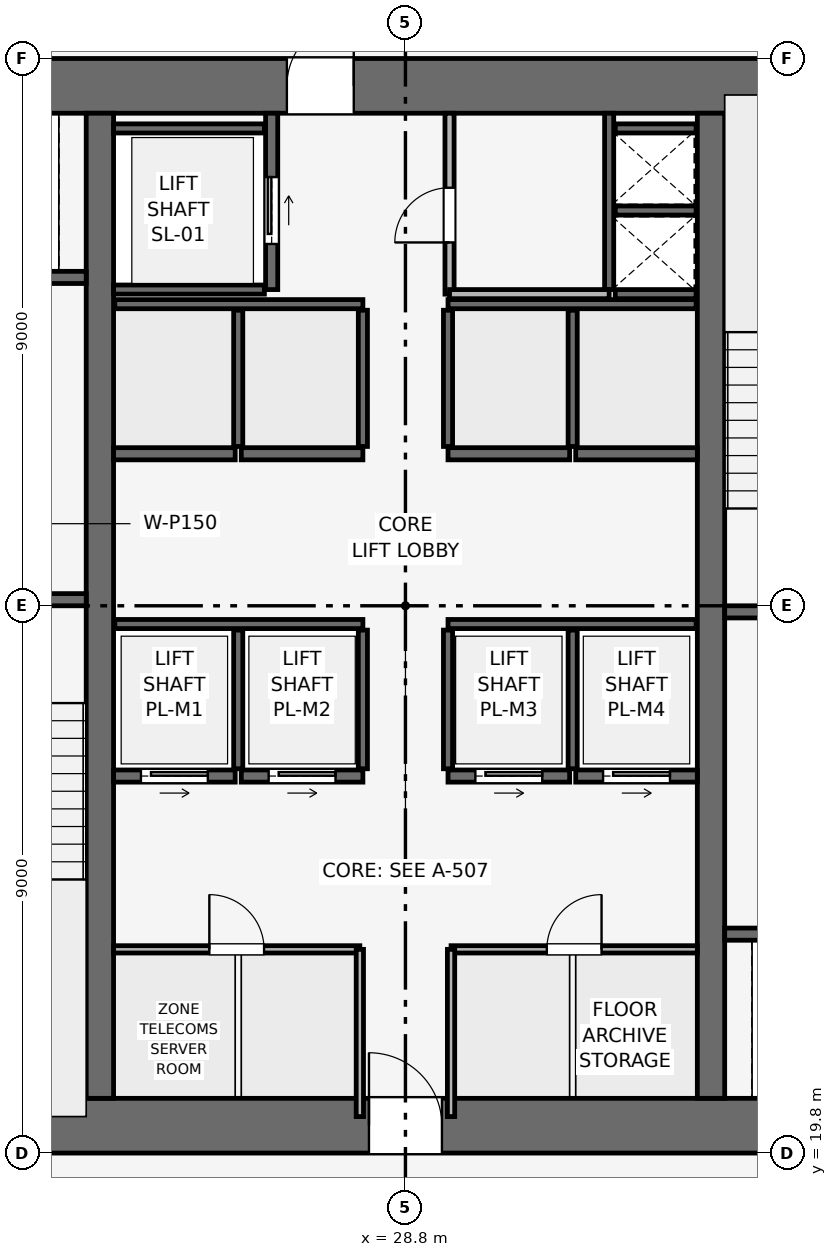
"""IFC4 building model, lengths in metres.
Left out: names, types, materials, properties, quantities, classifications, styles, units other than length and angle.
Written with IfcOpenShell. Run it as: python <this file> out.ifc"""

import sys

from ifc_helpers import new_model, si_unit, direction, frame, frame_2d, origin, place, context, subcontext, project, spatial, rectangle, extrude, element, fill, save


model = new_model("IFC4")
c1 = context("Model", 3, precision=1e-05, world=origin(), true_north=direction((0.0, 1.0)))
c2 = subcontext(c1, "Body", "Model", "MODEL_VIEW")
j1 = project(units=[si_unit("LENGTHUNIT", "METRE"), si_unit("PLANEANGLEUNIT", "RADIAN")], contexts=[c1])
p1 = place(None, origin())
s1 = spatial("IfcSite", under=j1, at=p1, CompositionType="ELEMENT")
p2 = place(p1, origin())
s2 = spatial("IfcBuilding", under=s1, at=p2, CompositionType="ELEMENT")
p3 = place(p2, frame((0.0, 0.0, 157.05)))
s3 = spatial("IfcBuildingStorey", under=s2, at=p3, CompositionType="ELEMENT", Elevation=157.05)
p4 = place(p3, frame((19.8, 20.25, 0.0), z_axis=(0.0, 0.0, 1.0), x_axis=(1.0, 0.0, 0.0)))
e1 = element("IfcWall", 1, at=p4, inside=s3, PredefinedType="SHEAR", context=c2, shape_type="SweptSolid", body=[
    extrude(rectangle(XDim=18.0, YDim=0.9, at=frame_2d((9.0, 0.0))), origin(), (0.0, 0.0, 1.0), 3.75),
])
p5 = place(p4, frame((8.4, 0.0, 0.0)))
e2 = element("IfcOpeningElement", 2, at=p5, cuts=e1, PredefinedType="OPENING", context=c2, shape_type="SweptSolid", body=[
    extrude(rectangle(XDim=1.2, YDim=2.2, at=frame_2d((0.6, 1.1))), frame((0.0, 0.46, 0.0), z_axis=(0.0, -1.0, 0.0), x_axis=(1.0, 0.0, 0.0)), (0.0, 0.0, 1.0), 0.92),
])
p6 = place(p3, frame((19.8, 37.35, 0.0), z_axis=(0.0, 0.0, 1.0), x_axis=(1.0, 0.0, 0.0)))
e3 = element("IfcWall", 3, at=p6, inside=s3, PredefinedType="SHEAR", context=c2, shape_type="SweptSolid", body=[
    extrude(rectangle(XDim=18.0, YDim=0.9, at=frame_2d((9.0, 0.0))), origin(), (0.0, 0.0, 1.0), 3.75),
])
p7 = place(p6, frame((7.05, 0.0, 0.0)))
e4 = element("IfcOpeningElement", 4, at=p7, cuts=e3, PredefinedType="OPENING", context=c2, shape_type="SweptSolid", body=[
    extrude(rectangle(XDim=1.1, YDim=2.15, at=frame_2d((0.55, 1.075))), frame((0.0, 0.46, 0.0), z_axis=(0.0, -1.0, 0.0), x_axis=(1.0, 0.0, 0.0)), (0.0, 0.0, 1.0), 0.92),
])
for number, where, z_axis, x_axis in (
    (5, (23.775, 20.7, 0.0), (0.0, 0.0, 1.0), (0.0, 1.0, 0.0)),
    (6, (33.825, 20.7, 0.0), (0.0, 0.0, 1.0), (0.0, 1.0, 0.0)),
):
    element("IfcWall", number, at=place(p3, frame(where, z_axis=z_axis, x_axis=x_axis)), inside=s3, PredefinedType="SHEAR", context=c2, shape_type="SweptSolid", body=[
        extrude(rectangle(XDim=16.2, YDim=0.45, at=frame_2d((8.1, 0.0))), origin(), (0.0, 0.0, 1.0), 3.75),
    ])
p8 = place(p3, frame((20.4, 28.9, 0.0), z_axis=(0.0, 0.0, 1.0), x_axis=(1.0, 0.0, 0.0)))
e7 = element("IfcWall", 7, at=p8, inside=s3, PredefinedType="SHEAR", context=c2, shape_type="SweptSolid", body=[
    extrude(rectangle(XDim=3.15, YDim=0.2, at=frame_2d((1.575, 0.0))), origin(), (0.0, 0.0, 1.0), 3.495),
])
p9 = place(p8, frame((0.8, 0.0, 0.0)))
e8 = element("IfcOpeningElement", 8, at=p9, cuts=e7, PredefinedType="OPENING", context=c2, shape_type="SweptSolid", body=[
    extrude(rectangle(XDim=1.0, YDim=2.1, at=frame_2d((0.5, 1.05))), frame((0.0, 0.11, 0.0), z_axis=(0.0, -1.0, 0.0), x_axis=(1.0, 0.0, 0.0)), (0.0, 0.0, 1.0), 0.22),
])
p10 = place(p3, frame((34.05, 28.7, 0.0), z_axis=(0.0, 0.0, 1.0), x_axis=(1.0, 0.0, 0.0)))
e9 = element("IfcWall", 9, at=p10, inside=s3, PredefinedType="SHEAR", context=c2, shape_type="SweptSolid", body=[
    extrude(rectangle(XDim=3.15, YDim=0.2, at=frame_2d((1.575, 0.0))), origin(), (0.0, 0.0, 1.0), 3.495),
])
p11 = place(p10, frame((0.8, 0.0, 0.0)))
e10 = element("IfcOpeningElement", 10, at=p11, cuts=e9, PredefinedType="OPENING", context=c2, shape_type="SweptSolid", body=[
    extrude(rectangle(XDim=1.0, YDim=2.1, at=frame_2d((0.5, 1.05))), frame((0.0, 0.11, 0.0), z_axis=(0.0, -1.0, 0.0), x_axis=(1.0, 0.0, 0.0)), (0.0, 0.0, 1.0), 0.22),
])
p12 = place(p3, frame((32.15, 34.0, 0.0), z_axis=(0.0, 0.0, 1.0), x_axis=(0.0, 1.0, 0.0)))
e11 = element("IfcWall", 11, at=p12, inside=s3, PredefinedType="SHEAR", context=c2, shape_type="SweptSolid", body=[
    extrude(rectangle(XDim=2.9, YDim=0.15, at=frame_2d((1.45, 0.0))), origin(), (0.0, 0.0, 1.0), 3.495),
])
for number, where, z_axis, x_axis in (
    (12, (32.25, 33.925, 0.0), (0.0, 0.0, 1.0), (1.0, 0.0, 0.0)),
    (13, (32.25, 35.3, 0.0), (0.0, 0.0, 1.0), (1.0, 0.0, 0.0)),
):
    element("IfcWall", number, at=place(p3, frame(where, z_axis=z_axis, x_axis=x_axis)), inside=s3, PredefinedType="SHEAR", context=c2, shape_type="SweptSolid", body=[
        extrude(rectangle(XDim=1.33, YDim=0.15, at=frame_2d((0.665, 0.0))), origin(), (0.0, 0.0, 1.0), 3.495),
    ])
p13 = place(p3, frame((20.5, 34.2, 0.0), z_axis=(0.0, 0.0, 1.0), x_axis=(1.0, 0.0, 0.0)))
e14 = element("IfcWall", 14, at=p13, inside=s3, PredefinedType="SHEAR", context=c2, shape_type="SweptSolid", body=[
    extrude(rectangle(XDim=3.05, YDim=0.2, at=frame_2d((1.525, 0.0))), origin(), (0.0, 0.0, 1.0), 3.495),
])
p14 = place(p13, frame((0.75, 0.0, 0.0)))
e15 = element("IfcOpeningElement", 15, at=p14, cuts=e14, PredefinedType="OPENING", context=c2, shape_type="SweptSolid", body=[
    extrude(rectangle(XDim=1.1, YDim=2.15, at=frame_2d((0.55, 1.075))), frame((0.0, 0.11, 0.0), z_axis=(0.0, -1.0, 0.0), x_axis=(1.0, 0.0, 0.0)), (0.0, 0.0, 1.0), 0.22),
])
p15 = place(p3, frame((34.05, 23.4, 0.0), z_axis=(0.0, 0.0, 1.0), x_axis=(1.0, 0.0, 0.0)))
e16 = element("IfcWall", 16, at=p15, inside=s3, PredefinedType="SHEAR", context=c2, shape_type="SweptSolid", body=[
    extrude(rectangle(XDim=3.05, YDim=0.2, at=frame_2d((1.525, 0.0))), origin(), (0.0, 0.0, 1.0), 3.495),
])
p16 = place(p15, frame((1.2, 0.0, 0.0)))
e17 = element("IfcOpeningElement", 17, at=p16, cuts=e16, PredefinedType="OPENING", context=c2, shape_type="SweptSolid", body=[
    extrude(rectangle(XDim=1.1, YDim=2.15, at=frame_2d((0.55, 1.075))), frame((0.0, 0.11, 0.0), z_axis=(0.0, -1.0, 0.0), x_axis=(1.0, 0.0, 0.0)), (0.0, 0.0, 1.0), 0.22),
])
p17 = place(p3, frame((26.6, 34.0, 0.0), z_axis=(0.0, 0.0, 1.0), x_axis=(0.0, 1.0, 0.0)))
e18 = element("IfcWall", 18, at=p17, inside=s3, PredefinedType="SHEAR", context=c2, shape_type="SweptSolid", body=[
    extrude(rectangle(XDim=2.9, YDim=0.2, at=frame_2d((1.45, 0.0))), origin(), (0.0, 0.0, 1.0), 3.495),
])
p18 = place(p17, frame((0.75, 0.0, 0.0)))
e19 = element("IfcOpeningElement", 19, at=p18, cuts=e18, PredefinedType="OPENING", context=c2, shape_type="SweptSolid", body=[
    extrude(rectangle(XDim=1.1, YDim=2.15, at=frame_2d((0.55, 1.075))), frame((0.0, 0.11, 0.0), z_axis=(0.0, -1.0, 0.0), x_axis=(1.0, 0.0, 0.0)), (0.0, 0.0, 1.0), 0.22),
])
for number, where, z_axis, x_axis in (
    (20, (24.0, 34.0, 0.0), (0.0, 0.0, 1.0), (1.0, 0.0, 0.0)),
    (21, (24.0, 36.65, 0.0), (0.0, 0.0, 1.0), (1.0, 0.0, 0.0)),
):
    element("IfcWall", number, at=place(p3, frame(where, z_axis=z_axis, x_axis=x_axis)), inside=s3, PredefinedType="SHEAR", context=c2, shape_type="SweptSolid", body=[
        extrude(rectangle(XDim=2.48, YDim=0.15, at=frame_2d((1.24, 0.0))), origin(), (0.0, 0.0, 1.0), 3.495),
    ])
p19 = place(p3, frame((24.0, 26.0, 0.0), z_axis=(0.0, 0.0, 1.0), x_axis=(1.0, 0.0, 0.0)))
e22 = element("IfcWall", 22, at=p19, inside=s3, PredefinedType="SHEAR", context=c2, shape_type="SweptSolid", body=[
    extrude(rectangle(XDim=2.0, YDim=0.2, at=frame_2d((1.0, 0.0))), origin(), (0.0, 0.0, 1.0), 3.495),
])
p20 = place(p19, frame((0.45, 0.0, 0.0)))
e23 = element("IfcOpeningElement", 23, at=p20, cuts=e22, PredefinedType="OPENING", context=c2, shape_type="SweptSolid", body=[
    extrude(rectangle(XDim=1.1, YDim=2.15, at=frame_2d((0.55, 1.075))), frame((0.0, 0.11, 0.0), z_axis=(0.0, -1.0, 0.0), x_axis=(1.0, 0.0, 0.0)), (0.0, 0.0, 1.0), 0.22),
])
p21 = place(p3, frame((26.1, 26.0, 0.0), z_axis=(0.0, 0.0, 1.0), x_axis=(1.0, 0.0, 0.0)))
e24 = element("IfcWall", 24, at=p21, inside=s3, PredefinedType="SHEAR", context=c2, shape_type="SweptSolid", body=[
    extrude(rectangle(XDim=2.0, YDim=0.2, at=frame_2d((1.0, 0.0))), origin(), (0.0, 0.0, 1.0), 3.495),
])
p22 = place(p21, frame((0.45, 0.0, 0.0)))
e25 = element("IfcOpeningElement", 25, at=p22, cuts=e24, PredefinedType="OPENING", context=c2, shape_type="SweptSolid", body=[
    extrude(rectangle(XDim=1.1, YDim=2.15, at=frame_2d((0.55, 1.075))), frame((0.0, 0.11, 0.0), z_axis=(0.0, -1.0, 0.0), x_axis=(1.0, 0.0, 0.0)), (0.0, 0.0, 1.0), 0.22),
])
p23 = place(p3, frame((29.5, 26.0, 0.0), z_axis=(0.0, 0.0, 1.0), x_axis=(1.0, 0.0, 0.0)))
e26 = element("IfcWall", 26, at=p23, inside=s3, PredefinedType="SHEAR", context=c2, shape_type="SweptSolid", body=[
    extrude(rectangle(XDim=2.0, YDim=0.2, at=frame_2d((1.0, 0.0))), origin(), (0.0, 0.0, 1.0), 3.495),
])
p24 = place(p23, frame((0.45, 0.0, 0.0)))
e27 = element("IfcOpeningElement", 27, at=p24, cuts=e26, PredefinedType="OPENING", context=c2, shape_type="SweptSolid", body=[
    extrude(rectangle(XDim=1.1, YDim=2.15, at=frame_2d((0.55, 1.075))), frame((0.0, 0.11, 0.0), z_axis=(0.0, -1.0, 0.0), x_axis=(1.0, 0.0, 0.0)), (0.0, 0.0, 1.0), 0.22),
])
p25 = place(p3, frame((31.6, 26.0, 0.0), z_axis=(0.0, 0.0, 1.0), x_axis=(1.0, 0.0, 0.0)))
e28 = element("IfcWall", 28, at=p25, inside=s3, PredefinedType="SHEAR", context=c2, shape_type="SweptSolid", body=[
    extrude(rectangle(XDim=2.0, YDim=0.2, at=frame_2d((1.0, 0.0))), origin(), (0.0, 0.0, 1.0), 3.495),
])
p26 = place(p25, frame((0.45, 0.0, 0.0)))
e29 = element("IfcOpeningElement", 29, at=p26, cuts=e28, PredefinedType="OPENING", context=c2, shape_type="SweptSolid", body=[
    extrude(rectangle(XDim=1.1, YDim=2.15, at=frame_2d((0.55, 1.075))), frame((0.0, 0.11, 0.0), z_axis=(0.0, -1.0, 0.0), x_axis=(1.0, 0.0, 0.0)), (0.0, 0.0, 1.0), 0.22),
])
for number, where, z_axis, x_axis in (
    (30, (24.0, 31.3, 0.0), (0.0, 0.0, 1.0), (1.0, 0.0, 0.0)),
    (31, (26.1, 31.3, 0.0), (0.0, 0.0, 1.0), (1.0, 0.0, 0.0)),
    (32, (29.5, 31.3, 0.0), (0.0, 0.0, 1.0), (1.0, 0.0, 0.0)),
    (33, (31.6, 31.3, 0.0), (0.0, 0.0, 1.0), (1.0, 0.0, 0.0)),
):
    element("IfcWall", number, at=place(p3, frame(where, z_axis=z_axis, x_axis=x_axis)), inside=s3, PredefinedType="SHEAR", context=c2, shape_type="SweptSolid", body=[
        extrude(rectangle(XDim=2.0, YDim=0.2, at=frame_2d((1.0, 0.0))), origin(), (0.0, 0.0, 1.0), 3.495),
    ])
p27 = place(p3, frame((32.25, 36.65, 0.0), z_axis=(0.0, 0.0, 1.0), x_axis=(1.0, 0.0, 0.0)))
e34 = element("IfcWall", 34, at=p27, inside=s3, PredefinedType="SHEAR", context=c2, shape_type="SweptSolid", body=[
    extrude(rectangle(XDim=1.33, YDim=0.15, at=frame_2d((0.665, 0.0))), origin(), (0.0, 0.0, 1.0), 3.495),
])
for number, where, z_axis, x_axis in (
    (35, (24.02, 28.5, 0.0), (0.0, 0.0, 1.0), (1.0, 0.0, 0.0)),
    (36, (29.5, 28.5, 0.0), (0.0, 0.0, 1.0), (1.0, 0.0, 0.0)),
):
    element("IfcWall", number, at=place(p3, frame(where, z_axis=z_axis, x_axis=x_axis)), inside=s3, PredefinedType="SHEAR", context=c2, shape_type="SweptSolid", body=[
        extrude(rectangle(XDim=4.08, YDim=0.15, at=frame_2d((2.04, 0.0))), origin(), (0.0, 0.0, 1.0), 3.495),
    ])
for number, where, z_axis, x_axis in (
    (37, (26.05, 26.12, 0.0), (0.0, 0.0, 1.0), (0.0, 1.0, 0.0)),
    (38, (28.1, 26.12, 0.0), (0.0, 0.0, 1.0), (0.0, 1.0, 0.0)),
    (39, (29.5, 26.12, 0.0), (0.0, 0.0, 1.0), (0.0, 1.0, 0.0)),
    (40, (31.55, 26.12, 0.0), (0.0, 0.0, 1.0), (0.0, 1.0, 0.0)),
):
    element("IfcWall", number, at=place(p3, frame(where, z_axis=z_axis, x_axis=x_axis)), inside=s3, PredefinedType="SHEAR", context=c2, shape_type="SweptSolid", body=[
        extrude(rectangle(XDim=2.28, YDim=0.15, at=frame_2d((1.14, 0.0))), origin(), (0.0, 0.0, 1.0), 3.495),
    ])
for number, where, z_axis, x_axis in (
    (41, (24.02, 33.76, 0.0), (0.0, 0.0, 1.0), (1.0, 0.0, 0.0)),
    (42, (29.5, 33.76, 0.0), (0.0, 0.0, 1.0), (1.0, 0.0, 0.0)),
):
    element("IfcWall", number, at=place(p3, frame(where, z_axis=z_axis, x_axis=x_axis)), inside=s3, PredefinedType="SHEAR", context=c2, shape_type="SweptSolid", body=[
        extrude(rectangle(XDim=4.08, YDim=0.15, at=frame_2d((2.04, 0.0))), origin(), (0.0, 0.0, 1.0), 3.495),
    ])
for number, where, z_axis, x_axis in (
    (43, (26.05, 31.42, 0.0), (0.0, 0.0, 1.0), (0.0, 1.0, 0.0)),
    (44, (28.1, 31.42, 0.0), (0.0, 0.0, 1.0), (0.0, 1.0, 0.0)),
    (45, (29.5, 31.42, 0.0), (0.0, 0.0, 1.0), (0.0, 1.0, 0.0)),
    (46, (31.55, 31.42, 0.0), (0.0, 0.0, 1.0), (0.0, 1.0, 0.0)),
):
    element("IfcWall", number, at=place(p3, frame(where, z_axis=z_axis, x_axis=x_axis)), inside=s3, PredefinedType="SHEAR", context=c2, shape_type="SweptSolid", body=[
        extrude(rectangle(XDim=2.24, YDim=0.15, at=frame_2d((1.12, 0.0))), origin(), (0.0, 0.0, 1.0), 3.495),
    ])
p28 = place(p3, frame((29.525, 33.925, 0.0), z_axis=(0.0, 0.0, 1.0), x_axis=(0.0, 1.0, 0.0)))
e47 = element("IfcWall", 47, at=p28, inside=s3, PredefinedType="PARTITIONING", context=c2, shape_type="SweptSolid", body=[
    extrude(rectangle(XDim=2.975, YDim=0.15, at=frame_2d((1.487, 0.0))), origin(), (0.0, 0.0, 1.0), 3.495),
])
p29 = place(p28, frame((0.85, 0.0, 0.0)))
e48 = element("IfcOpeningElement", 48, at=p29, cuts=e47, PredefinedType="OPENING", context=c2, shape_type="SweptSolid", body=[
    extrude(rectangle(XDim=0.9, YDim=2.1, at=frame_2d((0.45, 1.05))), frame((0.0, 0.085, 0.0), z_axis=(0.0, -1.0, 0.0), x_axis=(1.0, 0.0, 0.0)), (0.0, 0.0, 1.0), 0.17),
])
p30 = place(p3, frame((29.525, 33.925, 0.0), z_axis=(0.0, 0.0, 1.0), x_axis=(1.0, 0.0, 0.0)))
e49 = element("IfcWall", 49, at=p30, inside=s3, PredefinedType="PARTITIONING", context=c2, shape_type="SweptSolid", body=[
    extrude(rectangle(XDim=2.625, YDim=0.15, at=frame_2d((1.312, 0.0))), origin(), (0.0, 0.0, 1.0), 3.495),
])
p31 = place(p3, frame((24.0, 23.15, 0.0), z_axis=(0.0, 0.0, 1.0), x_axis=(1.0, 0.0, 0.0)))
e50 = element("IfcWall", 50, at=p31, inside=s3, PredefinedType="PARTITIONING", context=c2, shape_type="SweptSolid", body=[
    extrude(rectangle(XDim=4.05, YDim=0.12, at=frame_2d((2.025, 0.0))), origin(), (0.0, 0.0, 1.0), 3.495),
])
p32 = place(p31, frame((1.575, 0.0, 0.0)))
e51 = element("IfcOpeningElement", 51, at=p32, cuts=e50, PredefinedType="OPENING", context=c2, shape_type="SweptSolid", body=[
    extrude(rectangle(XDim=0.9, YDim=2.1, at=frame_2d((0.45, 1.05))), frame((0.0, 0.07, 0.0), z_axis=(0.0, -1.0, 0.0), x_axis=(1.0, 0.0, 0.0)), (0.0, 0.0, 1.0), 0.14),
])
p33 = place(p3, frame((28.05, 20.4, 0.0), z_axis=(0.0, 0.0, 1.0), x_axis=(0.0, 1.0, 0.0)))
e52 = element("IfcWall", 52, at=p33, inside=s3, PredefinedType="PARTITIONING", context=c2, shape_type="SweptSolid", body=[
    extrude(rectangle(XDim=2.75, YDim=0.12, at=frame_2d((1.375, 0.0))), origin(), (0.0, 0.0, 1.0), 3.495),
])
p34 = place(p3, frame((29.55, 23.15, 0.0), z_axis=(0.0, 0.0, 1.0), x_axis=(1.0, 0.0, 0.0)))
e53 = element("IfcWall", 53, at=p34, inside=s3, PredefinedType="PARTITIONING", context=c2, shape_type="SweptSolid", body=[
    extrude(rectangle(XDim=4.05, YDim=0.12, at=frame_2d((2.025, 0.0))), origin(), (0.0, 0.0, 1.0), 3.495),
])
p35 = place(p34, frame((1.575, 0.0, 0.0)))
e54 = element("IfcOpeningElement", 54, at=p35, cuts=e53, PredefinedType="OPENING", context=c2, shape_type="SweptSolid", body=[
    extrude(rectangle(XDim=0.9, YDim=2.1, at=frame_2d((0.45, 1.05))), frame((0.0, 0.07, 0.0), z_axis=(0.0, -1.0, 0.0), x_axis=(1.0, 0.0, 0.0)), (0.0, 0.0, 1.0), 0.14),
])
p36 = place(p3, frame((29.55, 20.4, 0.0), z_axis=(0.0, 0.0, 1.0), x_axis=(0.0, 1.0, 0.0)))
e55 = element("IfcWall", 55, at=p36, inside=s3, PredefinedType="PARTITIONING", context=c2, shape_type="SweptSolid", body=[
    extrude(rectangle(XDim=2.75, YDim=0.12, at=frame_2d((1.375, 0.0))), origin(), (0.0, 0.0, 1.0), 3.495),
])
p37 = place(p18, origin())
e56 = element("IfcDoor", 56, at=p37, inside=s3, OperationType="SLIDING_TO_RIGHT", PredefinedType="DOOR", context=c2, shape_type="SweptSolid", body=[
    extrude(rectangle(XDim=1.1, YDim=2.15, at=frame_2d((0.55, 1.075))), frame((0.0, 0.025, 0.0), z_axis=(0.0, -1.0, 0.0), x_axis=(1.0, 0.0, 0.0)), (0.0, 0.0, 1.0), 0.05),
])
fill(e19, e56)
p38 = place(p20, origin())
e57 = element("IfcDoor", 57, at=p38, inside=s3, OperationType="SLIDING_TO_RIGHT", PredefinedType="DOOR", context=c2, shape_type="SweptSolid", body=[
    extrude(rectangle(XDim=1.1, YDim=2.15, at=frame_2d((0.55, 1.075))), frame((0.0, 0.025, 0.0), z_axis=(0.0, -1.0, 0.0), x_axis=(1.0, 0.0, 0.0)), (0.0, 0.0, 1.0), 0.05),
])
fill(e23, e57)
p39 = place(p22, origin())
e58 = element("IfcDoor", 58, at=p39, inside=s3, OperationType="SLIDING_TO_RIGHT", PredefinedType="DOOR", context=c2, shape_type="SweptSolid", body=[
    extrude(rectangle(XDim=1.1, YDim=2.15, at=frame_2d((0.55, 1.075))), frame((0.0, 0.025, 0.0), z_axis=(0.0, -1.0, 0.0), x_axis=(1.0, 0.0, 0.0)), (0.0, 0.0, 1.0), 0.05),
])
fill(e25, e58)
p40 = place(p24, origin())
e59 = element("IfcDoor", 59, at=p40, inside=s3, OperationType="SLIDING_TO_RIGHT", PredefinedType="DOOR", context=c2, shape_type="SweptSolid", body=[
    extrude(rectangle(XDim=1.1, YDim=2.15, at=frame_2d((0.55, 1.075))), frame((0.0, 0.025, 0.0), z_axis=(0.0, -1.0, 0.0), x_axis=(1.0, 0.0, 0.0)), (0.0, 0.0, 1.0), 0.05),
])
fill(e27, e59)
p41 = place(p26, origin())
e60 = element("IfcDoor", 60, at=p41, inside=s3, OperationType="SLIDING_TO_RIGHT", PredefinedType="DOOR", context=c2, shape_type="SweptSolid", body=[
    extrude(rectangle(XDim=1.1, YDim=2.15, at=frame_2d((0.55, 1.075))), frame((0.0, 0.025, 0.0), z_axis=(0.0, -1.0, 0.0), x_axis=(1.0, 0.0, 0.0)), (0.0, 0.0, 1.0), 0.05),
])
fill(e29, e60)
p42 = place(p29, origin())
e61 = element("IfcDoor", 61, at=p42, inside=s3, OperationType="SINGLE_SWING_LEFT", PredefinedType="DOOR", context=c2, shape_type="SweptSolid", body=[
    extrude(rectangle(XDim=0.9, YDim=2.1, at=frame_2d((0.45, 1.05))), frame((0.0, 0.025, 0.0), z_axis=(0.0, -1.0, 0.0), x_axis=(1.0, 0.0, 0.0)), (0.0, 0.0, 1.0), 0.05),
])
fill(e48, e61)
p43 = place(p32, origin())
e62 = element("IfcDoor", 62, at=p43, inside=s3, OperationType="SINGLE_SWING_LEFT", PredefinedType="DOOR", context=c2, shape_type="SweptSolid", body=[
    extrude(rectangle(XDim=0.9, YDim=2.1, at=frame_2d((0.45, 1.05))), frame((0.0, 0.025, 0.0), z_axis=(0.0, -1.0, 0.0), x_axis=(1.0, 0.0, 0.0)), (0.0, 0.0, 1.0), 0.05),
])
fill(e51, e62)
p44 = place(p35, origin())
e63 = element("IfcDoor", 63, at=p44, inside=s3, OperationType="SINGLE_SWING_RIGHT", PredefinedType="DOOR", context=c2, shape_type="SweptSolid", body=[
    extrude(rectangle(XDim=0.9, YDim=2.1, at=frame_2d((0.45, 1.05))), frame((0.0, 0.025, 0.0), z_axis=(0.0, -1.0, 0.0), x_axis=(1.0, 0.0, 0.0)), (0.0, 0.0, 1.0), 0.05),
])
fill(e54, e63)
p45 = place(p5, origin())
e64 = element("IfcDoor", 64, at=p45, inside=s3, OperationType="SINGLE_SWING_LEFT", PredefinedType="DOOR", context=c2, shape_type="SweptSolid", body=[
    extrude(rectangle(XDim=1.2, YDim=2.2, at=frame_2d((0.6, 1.1))), frame((0.0, 0.025, 0.0), z_axis=(0.0, -1.0, 0.0), x_axis=(1.0, 0.0, 0.0)), (0.0, 0.0, 1.0), 0.05),
])
fill(e2, e64)
p46 = place(p7, origin())
e65 = element("IfcDoor", 65, at=p46, inside=s3, OperationType="SINGLE_SWING_RIGHT", PredefinedType="DOOR", context=c2, shape_type="SweptSolid", body=[
    extrude(rectangle(XDim=1.1, YDim=2.15, at=frame_2d((0.55, 1.075))), frame((0.0, 0.025, 0.0), z_axis=(0.0, -1.0, 0.0), x_axis=(1.0, 0.0, 0.0)), (0.0, 0.0, 1.0), 0.05),
])
fill(e4, e65)
save(model, sys.argv[1])
